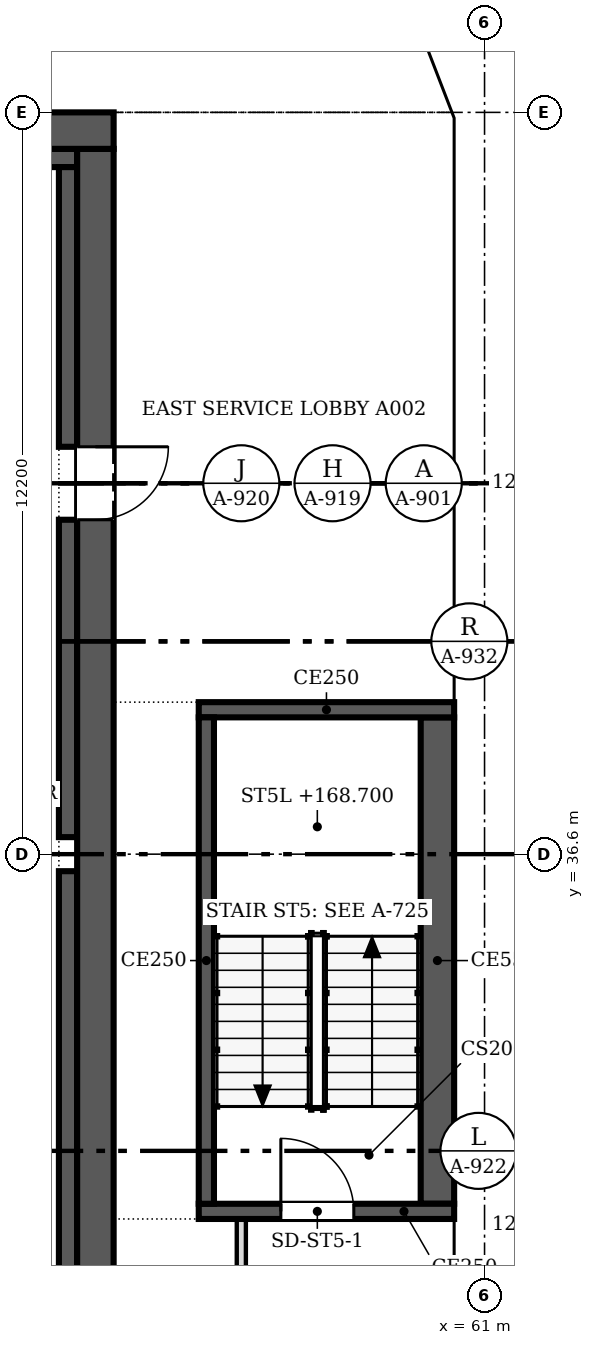
"""IFC4 building model, lengths in metres.
Left out: names, types, materials, properties, quantities, classifications, styles, units other than length and angle.
Written with IfcOpenShell. Run it as: python <this file> out.ifc"""

import sys

from ifc_helpers import new_model, si_unit, direction, frame, frame_2d, origin, place, context, subcontext, project, spatial, polyline, rectangle, outline, extrude, faceted_brep, source, transform, mapped, element, fill, save


model = new_model("IFC4")
c1 = context("Model", 3, precision=1e-05, world=origin(), true_north=direction((0.0, 1.0)))
c2 = subcontext(c1, "Body", "Model", "MODEL_VIEW")
j1 = project(units=[si_unit("LENGTHUNIT", "METRE"), si_unit("PLANEANGLEUNIT", "RADIAN")], contexts=[c1])
p1 = place(None, origin())
s1 = spatial("IfcSite", under=j1, at=p1, CompositionType="ELEMENT")
p2 = place(p1, origin())
s2 = spatial("IfcBuilding", under=s1, at=p2, CompositionType="ELEMENT")
p3 = place(p2, frame((0.0, 0.0, 166.8)))
s3 = spatial("IfcBuildingStorey", under=s2, at=p3, CompositionType="ELEMENT", Elevation=166.8)
m1 = source(origin(), c2, "Body", "SweptSolid", [
    extrude(outline(polyline([(3.05, 0.0), (6.1, 3.8), (3.05, 7.6), (0.0, 3.8), (3.05, 0.0)])), frame((0.0, 0.25, 0.0), z_axis=(0.0, -1.0, 0.0), x_axis=(1.0, 0.0, 0.0)), (0.0, 0.0, 1.0), 0.5),
])
p4 = place(p3, frame((60.75, 27.45, -3.8), z_axis=(0.0, 0.0, 1.0), x_axis=(0.0, 1.0, 0.0)))
e1 = element("IfcWall", 1, at=p4, inside=s3, PredefinedType="SOLIDWALL", context=c2, shape_type="MappedRepresentation", body=[
    mapped(m1, transform((0.0, 0.0, 0.0), scale=1.0)),
])
m2 = source(origin(), c2, "Body", "SweptSolid", [
    extrude(outline(polyline([(3.05, 0.399), (5.78, 3.8), (3.05, 7.201), (0.321, 3.8), (3.05, 0.399)])), frame((0.0, 0.26, 0.0), z_axis=(0.0, -1.0, 0.0), x_axis=(1.0, 0.0, 0.0)), (0.0, 0.0, 1.0), 0.52),
])
p5 = place(p4, origin())
e2 = element("IfcOpeningElement", 2, at=p5, cuts=e1, PredefinedType="OPENING", context=c2, shape_type="MappedRepresentation", body=[
    mapped(m2, transform((0.0, 0.0, 0.0), scale=1.0)),
])
m3 = source(origin(), c2, "Body", "Brep", [
    faceted_brep([(3.05, -0.25, 0.0), (6.1, -0.25, 3.8), (6.1, -0.25, 3.8), (3.05, -0.25, 7.6), (0.0, -0.25, 3.8), (0.0, 0.25, 3.8), (3.05, 0.25, 7.6), (6.1, 0.25, 3.8), (6.1, 0.25, 3.8), (3.05, 0.25, 0.0)], [[[0, 1, 2, 3, 4]], [[5, 6, 7, 8, 9]], [[9, 8, 1, 0]], [[7, 6, 3, 2]], [[6, 5, 4, 3]], [[5, 9, 0, 4]], [[1, 8, 7, 2]]]),
])
p6 = place(p3, frame((60.75, 33.55, -3.8), z_axis=(0.0, 0.0, 1.0), x_axis=(0.0, 1.0, 0.0)))
e3 = element("IfcWall", 3, at=p6, inside=s3, PredefinedType="SOLIDWALL", context=c2, shape_type="MappedRepresentation", body=[
    mapped(m3, transform((0.0, 0.0, 0.0), scale=1.0)),
])
p7 = place(p6, origin())
e4 = element("IfcOpeningElement", 4, at=p7, cuts=e3, PredefinedType="OPENING", context=c2, shape_type="MappedRepresentation", body=[
    mapped(m2, transform((0.0, 0.0, 0.0), scale=1.0)),
])
p8 = place(p3, frame((60.75, 39.65, -3.8), z_axis=(0.0, 0.0, 1.0), x_axis=(0.0, 1.0, 0.0)))
e5 = element("IfcWall", 5, at=p8, inside=s3, PredefinedType="SOLIDWALL", context=c2, shape_type="MappedRepresentation", body=[
    mapped(m1, transform((0.0, 0.0, 0.0), scale=1.0)),
])
p9 = place(p8, origin())
e6 = element("IfcOpeningElement", 6, at=p9, cuts=e5, PredefinedType="OPENING", context=c2, shape_type="MappedRepresentation", body=[
    mapped(m2, transform((0.0, 0.0, 0.0), scale=1.0)),
])
m4 = source(origin(), c2, "Body", "Brep", [
    faceted_brep([(3.003, -0.25, 0.0), (3.05, -0.25, 0.06), (3.05, -0.25, 7.54), (3.003, -0.25, 7.6), (0.0, -0.25, 3.8), (0.0, 0.25, 3.8), (2.957, 0.25, 7.541), (2.957, 0.25, 0.059), (3.003, 0.0, 0.0), (3.003, 0.0, 7.6)], [[[0, 1, 2, 3, 4]], [[5, 6, 7]], [[1, 0, 8]], [[9, 3, 2]], [[6, 5, 4, 3, 9]], [[5, 7, 8, 0, 4]], [[1, 8, 7, 6, 9, 2]]]),
])
p10 = place(p3, frame((60.75, 45.75, -3.8), z_axis=(0.0, 0.0, 1.0), x_axis=(0.0, 1.0, 0.0)))
e7 = element("IfcWall", 7, at=p10, inside=s3, PredefinedType="SOLIDWALL", context=c2, shape_type="MappedRepresentation", body=[
    mapped(m4, transform((0.0, 0.0, 0.0), scale=1.0)),
])
m5 = source(origin(), c2, "Body", "SweptSolid", [
    extrude(outline(polyline([(2.803, 6.944), (0.319, 3.8), (2.803, 0.656), (2.803, 6.944)])), frame((0.0, 0.26, 0.0), z_axis=(0.0, -1.0, 0.0), x_axis=(1.0, 0.0, 0.0)), (0.0, 0.0, 1.0), 0.52),
])
p11 = place(p10, origin())
e8 = element("IfcOpeningElement", 8, at=p11, cuts=e7, PredefinedType="OPENING", context=c2, shape_type="MappedRepresentation", body=[
    mapped(m5, transform((0.0, 0.0, 0.0), scale=1.0)),
])
m6 = source(origin(), c2, "Body", "Brep", [
    faceted_brep([(0.047, -0.25, 0.0), (2.997, -0.25, 3.8), (0.047, -0.25, 7.6), (0.0, -0.25, 7.541), (0.0, -0.25, 0.059), (0.093, 0.25, 7.54), (2.944, 0.25, 3.868), (2.944, 0.25, 3.732), (0.093, 0.25, 0.06), (2.997, 0.0, 3.8), (0.047, 0.0, 0.0), (0.047, 0.0, 7.6)], [[[0, 1, 2, 3, 4]], [[5, 6, 7, 8]], [[8, 7, 9, 1, 0, 10]], [[6, 5, 11, 2, 1, 9]], [[3, 2, 11]], [[10, 0, 4]], [[8, 10, 4, 3, 11, 5]], [[9, 7, 6]]]),
])
p12 = place(p3, frame((60.767, 48.71, -3.8), z_axis=(0.0, 0.0, 1.0), x_axis=(-0.359901446078, 0.932990326376, 0.0)))
e9 = element("IfcWall", 9, at=p12, inside=s3, PredefinedType="SOLIDWALL", context=c2, shape_type="MappedRepresentation", body=[
    mapped(m6, transform((0.0, 0.0, 0.0), scale=1.0)),
])
m7 = source(origin(), c2, "Body", "SweptSolid", [
    extrude(outline(polyline([(0.247, 0.665), (2.681, 3.8), (0.247, 6.935), (0.247, 0.665)])), frame((0.0, 0.26, 0.0), z_axis=(0.0, -1.0, 0.0), x_axis=(1.0, 0.0, 0.0)), (0.0, 0.0, 1.0), 0.52),
])
p13 = place(p12, origin())
e10 = element("IfcOpeningElement", 10, at=p13, cuts=e9, PredefinedType="OPENING", context=c2, shape_type="MappedRepresentation", body=[
    mapped(m7, transform((0.0, 0.0, 0.0), scale=1.0)),
])
p14 = place(p2, frame((0.0, 0.0, 170.6)))
s4 = spatial("IfcBuildingStorey", under=s2, at=p14, CompositionType="ELEMENT", Elevation=170.6)
m8 = source(origin(), c2, "Body", "SweptSolid", [
    extrude(outline(polyline([(3.05, 0.0), (6.1, 3.8), (3.05, 7.6), (0.0, 3.8), (3.05, 0.0)])), frame((0.0, 0.25, 0.0), z_axis=(0.0, -1.0, 0.0), x_axis=(1.0, 0.0, 0.0)), (0.0, 0.0, 1.0), 0.5),
])
p15 = place(p14, frame((60.75, 24.4, -3.8), z_axis=(0.0, 0.0, 1.0), x_axis=(0.0, 1.0, 0.0)))
e11 = element("IfcWall", 11, at=p15, inside=s4, PredefinedType="SOLIDWALL", context=c2, shape_type="MappedRepresentation", body=[
    mapped(m8, transform((0.0, 0.0, 0.0), scale=1.0)),
])
m9 = source(origin(), c2, "Body", "SweptSolid", [
    extrude(outline(polyline([(3.05, 0.399), (5.78, 3.8), (3.05, 7.2), (0.321, 3.8), (3.05, 0.399)])), frame((0.0, 0.26, 0.0), z_axis=(0.0, -1.0, 0.0), x_axis=(1.0, 0.0, 0.0)), (0.0, 0.0, 1.0), 0.52),
])
p16 = place(p15, origin())
e12 = element("IfcOpeningElement", 12, at=p16, cuts=e11, PredefinedType="OPENING", context=c2, shape_type="MappedRepresentation", body=[
    mapped(m9, transform((0.0, 0.0, 0.0), scale=1.0)),
])
p17 = place(p14, frame((60.75, 30.5, -3.8), z_axis=(0.0, 0.0, 1.0), x_axis=(0.0, 1.0, 0.0)))
e13 = element("IfcWall", 13, at=p17, inside=s4, PredefinedType="SOLIDWALL", context=c2, shape_type="MappedRepresentation", body=[
    mapped(m8, transform((0.0, 0.0, 0.0), scale=1.0)),
])
p18 = place(p17, origin())
e14 = element("IfcOpeningElement", 14, at=p18, cuts=e13, PredefinedType="OPENING", context=c2, shape_type="MappedRepresentation", body=[
    mapped(m9, transform((0.0, 0.0, 0.0), scale=1.0)),
])
m10 = source(origin(), c2, "Body", "Brep", [
    faceted_brep([(3.05, -0.25, 0.0), (6.1, -0.25, 3.8), (6.1, -0.25, 3.8), (3.05, -0.25, 7.6), (0.0, -0.25, 3.8), (0.0, 0.25, 3.8), (3.05, 0.25, 7.6), (6.1, 0.25, 3.8), (6.1, 0.25, 3.8), (3.05, 0.25, 0.0)], [[[0, 1, 2, 3, 4]], [[5, 6, 7, 8, 9]], [[9, 8, 1, 0]], [[7, 6, 3, 2]], [[6, 5, 4, 3]], [[5, 9, 0, 4]], [[1, 8, 7, 2]]]),
])
p19 = place(p14, frame((60.75, 36.6, -3.8), z_axis=(0.0, 0.0, 1.0), x_axis=(0.0, 1.0, 0.0)))
e15 = element("IfcWall", 15, at=p19, inside=s4, PredefinedType="SOLIDWALL", context=c2, shape_type="MappedRepresentation", body=[
    mapped(m10, transform((0.0, 0.0, 0.0), scale=1.0)),
])
p20 = place(p19, origin())
e16 = element("IfcOpeningElement", 16, at=p20, cuts=e15, PredefinedType="OPENING", context=c2, shape_type="MappedRepresentation", body=[
    mapped(m9, transform((0.0, 0.0, 0.0), scale=1.0)),
])
m11 = source(origin(), c2, "Body", "Brep", [
    faceted_brep([(3.05, -0.25, 0.0), (6.053, -0.25, 3.8), (3.05, -0.25, 7.6), (0.0, -0.25, 3.8), (0.0, 0.25, 3.8), (3.05, 0.25, 7.6), (6.007, 0.25, 3.859), (6.007, 0.25, 3.741), (3.05, 0.25, 0.0), (6.053, 0.0, 3.8)], [[[0, 1, 2, 3]], [[4, 5, 6, 7, 8]], [[8, 7, 9, 1, 0]], [[6, 5, 2, 1, 9]], [[5, 4, 3, 2]], [[4, 8, 0, 3]], [[7, 6, 9]]]),
])
p21 = place(p14, frame((60.75, 42.7, -3.8), z_axis=(0.0, 0.0, 1.0), x_axis=(0.0, 1.0, 0.0)))
e17 = element("IfcWall", 17, at=p21, inside=s4, PredefinedType="SOLIDWALL", context=c2, shape_type="MappedRepresentation", body=[
    mapped(m11, transform((0.0, 0.0, 0.0), scale=1.0)),
])
m12 = source(origin(), c2, "Body", "SweptSolid", [
    extrude(outline(polyline([(3.049, 0.401), (5.735, 3.8), (3.049, 7.199), (0.321, 3.8), (3.049, 0.401)])), frame((0.0, 0.26, 0.0), z_axis=(0.0, -1.0, 0.0), x_axis=(1.0, 0.0, 0.0)), (0.0, 0.0, 1.0), 0.52),
])
p22 = place(p21, origin())
e18 = element("IfcOpeningElement", 18, at=p22, cuts=e17, PredefinedType="OPENING", context=c2, shape_type="MappedRepresentation", body=[
    mapped(m12, transform((0.0, 0.0, 0.0), scale=1.0)),
])
m13 = source(origin(), c2, "Body", "Brep", [
    faceted_brep([(2.95, -0.25, 0.0), (3.003, -0.25, 0.068), (3.003, -0.25, 7.531), (2.95, -0.25, 7.6), (0.0, -0.25, 3.8), (0.047, 0.25, 3.86), (2.898, 0.25, 7.532), (2.898, 0.25, 0.068), (0.047, 0.25, 3.74), (2.95, 0.0, 0.0), (2.95, 0.0, 7.6), (0.0, 0.0, 3.8)], [[[0, 1, 2, 3, 4]], [[5, 6, 7, 8]], [[1, 0, 9]], [[10, 3, 2]], [[6, 5, 11, 4, 3, 10]], [[8, 7, 9, 0, 4, 11]], [[8, 11, 5]], [[1, 9, 7, 6, 10, 2]]]),
])
p23 = place(p14, frame((60.75, 48.753, -3.8), z_axis=(0.0, 0.0, 1.0), x_axis=(-0.35992665181, 0.932980602862, 0.0)))
e19 = element("IfcWall", 19, at=p23, inside=s4, PredefinedType="SOLIDWALL", context=c2, shape_type="MappedRepresentation", body=[
    mapped(m13, transform((0.0, 0.0, 0.0), scale=1.0)),
])
m14 = source(origin(), c2, "Body", "SweptSolid", [
    extrude(outline(polyline([(2.75, 6.935), (0.316, 3.8), (2.75, 0.665), (2.75, 6.935)])), frame((0.0, 0.26, 0.0), z_axis=(0.0, -1.0, 0.0), x_axis=(1.0, 0.0, 0.0)), (0.0, 0.0, 1.0), 0.52),
])
p24 = place(p23, origin())
e20 = element("IfcOpeningElement", 20, at=p24, cuts=e19, PredefinedType="OPENING", context=c2, shape_type="MappedRepresentation", body=[
    mapped(m14, transform((0.0, 0.0, 0.0), scale=1.0)),
])
p25 = place(p3, frame((30.5, 48.5, 0.0), z_axis=(0.0, 0.0, 1.0), x_axis=(1.0, 0.0, 0.0)))
e21 = element("IfcWall", 21, at=p25, inside=s3, PredefinedType="SHEAR", context=c2, shape_type="SweptSolid", body=[
    extrude(rectangle(XDim=24.4, YDim=0.6, at=frame_2d((12.2, 0.0))), origin(), (0.0, 0.0, 1.0), 3.8),
])
p26 = place(p3, frame((54.6, 48.2, 0.0), z_axis=(0.0, 0.0, 1.0), x_axis=(0.0, -1.0, 0.0)))
e22 = element("IfcWall", 22, at=p26, inside=s3, PredefinedType="SHEAR", context=c2, shape_type="SweptSolid", body=[
    extrude(rectangle(XDim=23.2, YDim=0.6, at=frame_2d((11.6, 0.0))), origin(), (0.0, 0.0, 1.0), 3.8),
])
m15 = source(origin(), c2, "Body", "SweptSolid", [
    extrude(rectangle(XDim=1.2, YDim=2.1, at=frame_2d((0.6, 1.05))), frame((0.0, 0.31, 0.0), z_axis=(0.0, -1.0, 0.0), x_axis=(1.0, 0.0, 0.0)), (0.0, 0.0, 1.0), 0.62),
])
p27 = place(p26, frame((4.9, 0.0, 0.0)))
e23 = element("IfcOpeningElement", 23, at=p27, cuts=e22, PredefinedType="OPENING", context=c2, shape_type="MappedRepresentation", body=[
    mapped(m15, transform((0.0, 0.0, 0.0), scale=1.0)),
])
p28 = place(p3, frame((31.1, 48.05, 0.0), z_axis=(0.0, 0.0, 1.0), x_axis=(1.0, 0.0, 0.0)))
e24 = element("IfcWall", 24, at=p28, inside=s3, PredefinedType="SOLIDWALL", context=c2, shape_type="SweptSolid", body=[
    extrude(rectangle(XDim=23.2, YDim=0.3, at=frame_2d((11.6, 0.0))), origin(), (0.0, 0.0, 1.0), 3.8),
])
p29 = place(p3, frame((54.15, 25.3, 0.0), z_axis=(0.0, 0.0, 1.0), x_axis=(0.0, 1.0, 0.0)))
e25 = element("IfcWall", 25, at=p29, inside=s3, PredefinedType="SOLIDWALL", context=c2, shape_type="SweptSolid", body=[
    extrude(rectangle(XDim=11.02, YDim=0.3, at=frame_2d((5.51, 0.0))), origin(), (0.0, 0.0, 1.0), 3.8),
])
p30 = place(p3, frame((54.15, 36.88, 0.0), z_axis=(0.0, 0.0, 1.0), x_axis=(0.0, 1.0, 0.0)))
e26 = element("IfcWall", 26, at=p30, inside=s3, PredefinedType="SOLIDWALL", context=c2, shape_type="SweptSolid", body=[
    extrude(rectangle(XDim=5.22, YDim=0.3, at=frame_2d((2.61, 0.0))), origin(), (0.0, 0.0, 1.0), 3.8),
])
p31 = place(p3, frame((54.15, 43.3, 0.0), z_axis=(0.0, 0.0, 1.0), x_axis=(0.0, 1.0, 0.0)))
e27 = element("IfcWall", 27, at=p31, inside=s3, PredefinedType="SOLIDWALL", context=c2, shape_type="SweptSolid", body=[
    extrude(rectangle(XDim=4.6, YDim=0.3, at=frame_2d((2.3, 0.0))), origin(), (0.0, 0.0, 1.0), 3.8),
])
p32 = place(p3, frame((60.5, 30.725, 0.0), z_axis=(0.0, 0.0, 1.0), x_axis=(-1.0, 0.0, 0.0)))
e28 = element("IfcWall", 28, at=p32, inside=s3, PredefinedType="SOLIDWALL", context=c2, shape_type="SweptSolid", body=[
    extrude(rectangle(XDim=4.2, YDim=0.25, at=frame_2d((2.1, 0.0))), origin(), (0.0, 0.0, 1.0), 3.8),
])
m16 = source(origin(), c2, "Body", "SweptSolid", [
    extrude(rectangle(XDim=1.2, YDim=2.1, at=frame_2d((0.6, 1.05))), frame((0.0, 0.135, 0.0), z_axis=(0.0, -1.0, 0.0), x_axis=(1.0, 0.0, 0.0)), (0.0, 0.0, 1.0), 0.27),
])
p33 = place(p32, frame((1.65, 0.0, 0.0)))
e29 = element("IfcOpeningElement", 29, at=p33, cuts=e28, PredefinedType="OPENING", context=c2, shape_type="MappedRepresentation", body=[
    mapped(m16, transform((0.0, 0.0, 0.0), scale=1.0)),
])
p34 = place(p3, frame((56.425, 30.85, 0.0), z_axis=(0.0, 0.0, 1.0), x_axis=(0.0, 1.0, 0.0)))
e30 = element("IfcWall", 30, at=p34, inside=s3, PredefinedType="SOLIDWALL", context=c2, shape_type="SweptSolid", body=[
    extrude(rectangle(XDim=8.0, YDim=0.25, at=frame_2d((4.0, 0.0))), origin(), (0.0, 0.0, 1.0), 3.8),
])
p35 = place(p3, frame((56.3, 38.975, 0.0), z_axis=(0.0, 0.0, 1.0), x_axis=(1.0, 0.0, 0.0)))
e31 = element("IfcWall", 31, at=p35, inside=s3, PredefinedType="SOLIDWALL", context=c2, shape_type="SweptSolid", body=[
    extrude(rectangle(XDim=4.2, YDim=0.25, at=frame_2d((2.1, 0.0))), origin(), (0.0, 0.0, 1.0), 3.8),
])
p36 = place(p3, frame((60.225, 38.85, 0.0), z_axis=(0.0, 0.0, 1.0), x_axis=(0.0, -1.0, 0.0)))
e32 = element("IfcWall", 32, at=p36, inside=s3, PredefinedType="SOLIDWALL", context=c2, shape_type="SweptSolid", body=[
    extrude(rectangle(XDim=8.0, YDim=0.55, at=frame_2d((4.0, 0.0))), origin(), (0.0, 0.0, 1.0), 3.8),
])
p37 = place(p3, frame((57.0, 30.6, 0.0), z_axis=(0.0, 0.0, 1.0), x_axis=(0.0, -1.0, 0.0)))
e33 = element("IfcWall", 33, at=p37, inside=s3, PredefinedType="PARTITIONING", context=c2, shape_type="SweptSolid", body=[
    extrude(rectangle(XDim=8.3, YDim=0.15, at=frame_2d((4.15, 0.0))), origin(), (0.0, 0.0, 1.0), 3.067),
])
m17 = source(origin(), c2, "Body", "SweptSolid", [
    extrude(rectangle(XDim=0.9, YDim=2.1, at=frame_2d((0.45, 1.05))), frame((0.0, 0.085, 0.0), z_axis=(0.0, -1.0, 0.0), x_axis=(1.0, 0.0, 0.0)), (0.0, 0.0, 1.0), 0.17),
])
p38 = place(p37, frame((3.7, 0.0, 0.0)))
e34 = element("IfcOpeningElement", 34, at=p38, cuts=e33, PredefinedType="OPENING", context=c2, shape_type="MappedRepresentation", body=[
    mapped(m17, transform((0.0, 0.0, 0.0), scale=1.0)),
])
m18 = source(origin(), c2, "Body", "SweptSolid", [
    extrude(rectangle(XDim=1.2, YDim=2.1, at=frame_2d((0.6, 1.05))), frame((0.0, 0.025, 0.0), z_axis=(0.0, -1.0, 0.0), x_axis=(1.0, 0.0, 0.0)), (0.0, 0.0, 1.0), 0.05),
])
p39 = place(p27, origin())
e35 = element("IfcDoor", 35, at=p39, inside=s3, OperationType="SINGLE_SWING_LEFT", PredefinedType="DOOR", context=c2, shape_type="MappedRepresentation", body=[
    mapped(m18, transform((0.0, 0.0, 0.0), scale=1.0)),
])
fill(e23, e35)
p40 = place(p33, origin())
e36 = element("IfcDoor", 36, at=p40, inside=s3, OperationType="SINGLE_SWING_RIGHT", PredefinedType="DOOR", context=c2, shape_type="MappedRepresentation", body=[
    mapped(m18, transform((0.0, 0.0, 0.0), scale=1.0)),
])
fill(e29, e36)
save(model, sys.argv[1])
